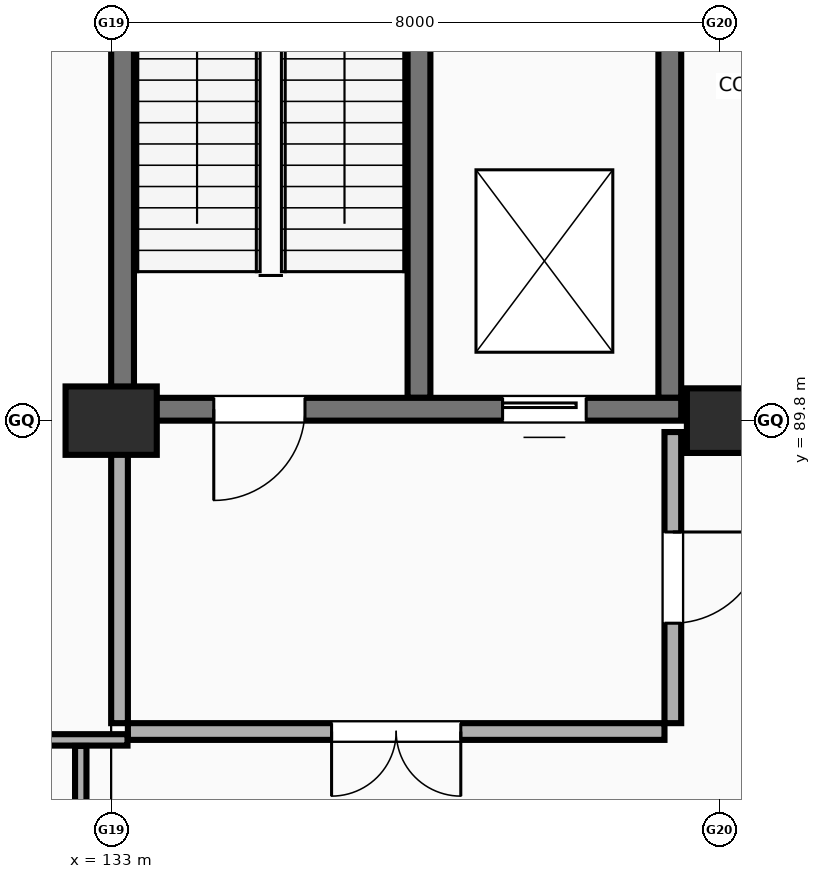
"""IFC4 building model, lengths in metres.
Left out: names, types, materials, properties, quantities, classifications, styles, units other than length and angle.
Written with IfcOpenShell. Run it as: python <this file> out.ifc"""

import sys

from ifc_helpers import new_model, si_unit, direction, frame, frame_2d, origin, origin_2d, place, context, subcontext, project, spatial, rectangle, extrude, element, fill, save


model = new_model("IFC4")
c1 = context("Model", 3, precision=1e-05, world=origin(), true_north=direction((0.0, 1.0)))
c2 = subcontext(c1, "Body", "Model", "MODEL_VIEW")
j1 = project(units=[si_unit("LENGTHUNIT", "METRE"), si_unit("PLANEANGLEUNIT", "RADIAN")], contexts=[c1])
p1 = place(None, origin())
s1 = spatial("IfcSite", under=j1, at=p1, CompositionType="ELEMENT")
p2 = place(p1, origin())
s2 = spatial("IfcBuilding", under=s1, at=p2, CompositionType="ELEMENT")
p3 = place(p2, origin())
s3 = spatial("IfcBuildingStorey", under=s2, at=p3, CompositionType="ELEMENT", Elevation=0.0)
p4 = place(p3, frame((133.0, 89.8, 0.0), z_axis=(0.0, 0.0, 1.0), x_axis=(1.0, 0.0, 0.0)))
e1 = element("IfcColumn", 1, at=p4, inside=s3, PredefinedType="COLUMN", context=c2, shape_type="SweptSolid", body=[
    extrude(rectangle(XDim=1.2, YDim=0.9, at=origin_2d()), origin(), (0.0, 0.0, 1.0), 5.4),
])
p5 = place(p3, frame((141.0, 89.8, 0.0), z_axis=(0.0, 0.0, 1.0), x_axis=(1.0, 0.0, 0.0)))
e2 = element("IfcColumn", 2, at=p5, inside=s3, PredefinedType="COLUMN", context=c2, shape_type="SweptSolid", body=[
    extrude(rectangle(XDim=0.85, YDim=0.85, at=origin_2d()), origin(), (0.0, 0.0, 1.0), 5.4),
])
for number, where, z_axis, x_axis in (
    (3, (133.15, 90.1, 0.0), (0.0, 0.0, 1.0), (0.0, 1.0, 0.0)),
    (4, (140.35, 90.1, 0.0), (0.0, 0.0, 1.0), (0.0, 1.0, 0.0)),
    (5, (137.05, 90.1, 0.0), (0.0, 0.0, 1.0), (0.0, 1.0, 0.0)),
):
    element("IfcWall", number, at=place(p3, frame(where, z_axis=z_axis, x_axis=x_axis)), inside=s3, PredefinedType="SHEAR", context=c2, shape_type="SweptSolid", body=[
        extrude(rectangle(XDim=8.2, YDim=0.3, at=frame_2d((4.1, 0.0))), origin(), (0.0, 0.0, 1.0), 5.4),
    ])
p6 = place(p3, frame((133.0, 89.95, 0.0), z_axis=(0.0, 0.0, 1.0), x_axis=(1.0, 0.0, 0.0)))
e6 = element("IfcWall", 6, at=p6, inside=s3, PredefinedType="SHEAR", context=c2, shape_type="SweptSolid", body=[
    extrude(rectangle(XDim=7.5, YDim=0.3, at=frame_2d((3.75, 0.0))), origin(), (0.0, 0.0, 1.0), 5.4),
])
p7 = place(p6, frame((2.55, 0.0, 0.0), z_axis=(0.0, 0.0, 1.0), x_axis=(-1.0, 0.0, 0.0)))
e7 = element("IfcOpeningElement", 7, at=p7, cuts=e6, PredefinedType="OPENING", context=c2, shape_type="SweptSolid", body=[
    extrude(rectangle(XDim=1.2, YDim=2.15, at=frame_2d((0.6, 1.075))), frame((0.0, 0.16, 0.0), z_axis=(0.0, -1.0, 0.0), x_axis=(1.0, 0.0, 0.0)), (0.0, 0.0, 1.0), 0.32),
])
p8 = place(p6, frame((5.15, 0.0, 0.0)))
e8 = element("IfcOpeningElement", 8, at=p8, cuts=e6, PredefinedType="OPENING", context=c2, shape_type="SweptSolid", body=[
    extrude(rectangle(XDim=1.1, YDim=2.15, at=frame_2d((0.55, 1.075))), frame((0.0, 0.16, 0.0), z_axis=(0.0, -1.0, 0.0), x_axis=(1.0, 0.0, 0.0)), (0.0, 0.0, 1.0), 0.32),
])
p9 = place(p3, frame((133.22, 85.71, 0.0), z_axis=(0.0, 0.0, 1.0), x_axis=(1.0, 0.0, 0.0)))
e9 = element("IfcWall", 9, at=p9, inside=s3, PredefinedType="SOLIDWALL", context=c2, shape_type="SweptSolid", body=[
    extrude(rectangle(XDim=7.06, YDim=0.22, at=frame_2d((3.53, 0.0))), origin(), (0.0, 0.0, 1.0), 4.2),
])
p10 = place(p9, frame((4.38, 0.0, 0.0), z_axis=(0.0, 0.0, 1.0), x_axis=(-1.0, 0.0, 0.0)))
e10 = element("IfcOpeningElement", 10, at=p10, cuts=e9, PredefinedType="OPENING", context=c2, shape_type="SweptSolid", body=[
    extrude(rectangle(XDim=1.7, YDim=2.18, at=frame_2d((0.85, 1.09))), frame((0.0, 0.12, 0.0), z_axis=(0.0, -1.0, 0.0), x_axis=(1.0, 0.0, 0.0)), (0.0, 0.0, 1.0), 0.24),
])
p11 = place(p3, frame((133.11, 85.82, 0.0), z_axis=(0.0, 0.0, 1.0), x_axis=(0.0, 1.0, 0.0)))
e11 = element("IfcWall", 11, at=p11, inside=s3, PredefinedType="SOLIDWALL", context=c2, shape_type="SweptSolid", body=[
    extrude(rectangle(XDim=3.83, YDim=0.22, at=frame_2d((1.915, 0.0))), origin(), (0.0, 0.0, 1.0), 4.2),
])
p12 = place(p3, frame((140.39, 85.82, 0.0), z_axis=(0.0, 0.0, 1.0), x_axis=(0.0, 1.0, 0.0)))
e12 = element("IfcWall", 12, at=p12, inside=s3, PredefinedType="SOLIDWALL", context=c2, shape_type="SweptSolid", body=[
    extrude(rectangle(XDim=3.83, YDim=0.22, at=frame_2d((1.915, 0.0))), origin(), (0.0, 0.0, 1.0), 4.2),
])
p13 = place(p12, frame((2.515, 0.0, 0.0), z_axis=(0.0, 0.0, 1.0), x_axis=(-1.0, 0.0, 0.0)))
e13 = element("IfcOpeningElement", 13, at=p13, cuts=e12, PredefinedType="OPENING", context=c2, shape_type="SweptSolid", body=[
    extrude(rectangle(XDim=1.2, YDim=2.15, at=frame_2d((0.6, 1.075))), frame((0.0, 0.12, 0.0), z_axis=(0.0, -1.0, 0.0), x_axis=(1.0, 0.0, 0.0)), (0.0, 0.0, 1.0), 0.24),
])
p14 = place(p3, frame((110.265, 85.6, 0.0), z_axis=(0.0, 0.0, 1.0), x_axis=(1.0, 0.0, 0.0)))
e14 = element("IfcWall", 14, at=p14, inside=s3, PredefinedType="PARTITIONING", context=c2, shape_type="SweptSolid", body=[
    extrude(rectangle(XDim=22.95, YDim=0.15, at=frame_2d((11.475, 0.0))), origin(), (0.0, 0.0, 1.0), 4.2),
])
p15 = place(p14, frame((10.235, 0.0, 0.0)))
e15 = element("IfcOpeningElement", 15, at=p15, cuts=e14, PredefinedType="OPENING", context=c2, shape_type="SweptSolid", body=[
    extrude(rectangle(XDim=2.4, YDim=2.6, at=frame_2d((1.2, 1.3))), frame((0.0, 0.085, 0.0), z_axis=(0.0, -1.0, 0.0), x_axis=(1.0, 0.0, 0.0)), (0.0, 0.0, 1.0), 0.17),
])
p16 = place(p3, frame((132.6, 81.67, 0.0), z_axis=(0.0, 0.0, 1.0), x_axis=(0.0, 1.0, 0.0)))
e16 = element("IfcWall", 16, at=p16, inside=s3, PredefinedType="PARTITIONING", context=c2, shape_type="SweptSolid", body=[
    extrude(rectangle(XDim=3.85, YDim=0.15, at=frame_2d((1.925, 0.0))), origin(), (0.0, 0.0, 1.0), 4.2),
])
p17 = place(p7, origin())
e17 = element("IfcDoor", 17, at=p17, inside=s3, OperationType="SINGLE_SWING_RIGHT", PredefinedType="DOOR", context=c2, shape_type="SweptSolid", body=[
    extrude(rectangle(XDim=1.2, YDim=2.15, at=frame_2d((0.6, 1.075))), frame((0.0, 0.025, 0.0), z_axis=(0.0, -1.0, 0.0), x_axis=(1.0, 0.0, 0.0)), (0.0, 0.0, 1.0), 0.05),
])
fill(e7, e17)
p18 = place(p8, origin())
e18 = element("IfcDoor", 18, at=p18, inside=s3, OperationType="SLIDING_TO_LEFT", PredefinedType="DOOR", context=c2, shape_type="SweptSolid", body=[
    extrude(rectangle(XDim=1.1, YDim=2.15, at=frame_2d((0.55, 1.075))), frame((0.0, 0.025, 0.0), z_axis=(0.0, -1.0, 0.0), x_axis=(1.0, 0.0, 0.0)), (0.0, 0.0, 1.0), 0.05),
])
fill(e8, e18)
p19 = place(p10, origin())
e19 = element("IfcDoor", 19, at=p19, inside=s3, OperationType="DOUBLE_DOOR_SINGLE_SWING", PredefinedType="DOOR", context=c2, shape_type="SweptSolid", body=[
    extrude(rectangle(XDim=1.7, YDim=2.18, at=frame_2d((0.85, 1.09))), frame((0.0, 0.025, 0.0), z_axis=(0.0, -1.0, 0.0), x_axis=(1.0, 0.0, 0.0)), (0.0, 0.0, 1.0), 0.05),
])
fill(e10, e19)
p20 = place(p13, origin())
e20 = element("IfcDoor", 20, at=p20, inside=s3, OperationType="SINGLE_SWING_LEFT", PredefinedType="DOOR", context=c2, shape_type="SweptSolid", body=[
    extrude(rectangle(XDim=1.2, YDim=2.15, at=frame_2d((0.6, 1.075))), frame((0.0, 0.025, 0.0), z_axis=(0.0, -1.0, 0.0), x_axis=(1.0, 0.0, 0.0)), (0.0, 0.0, 1.0), 0.05),
])
fill(e13, e20)
save(model, sys.argv[1])
